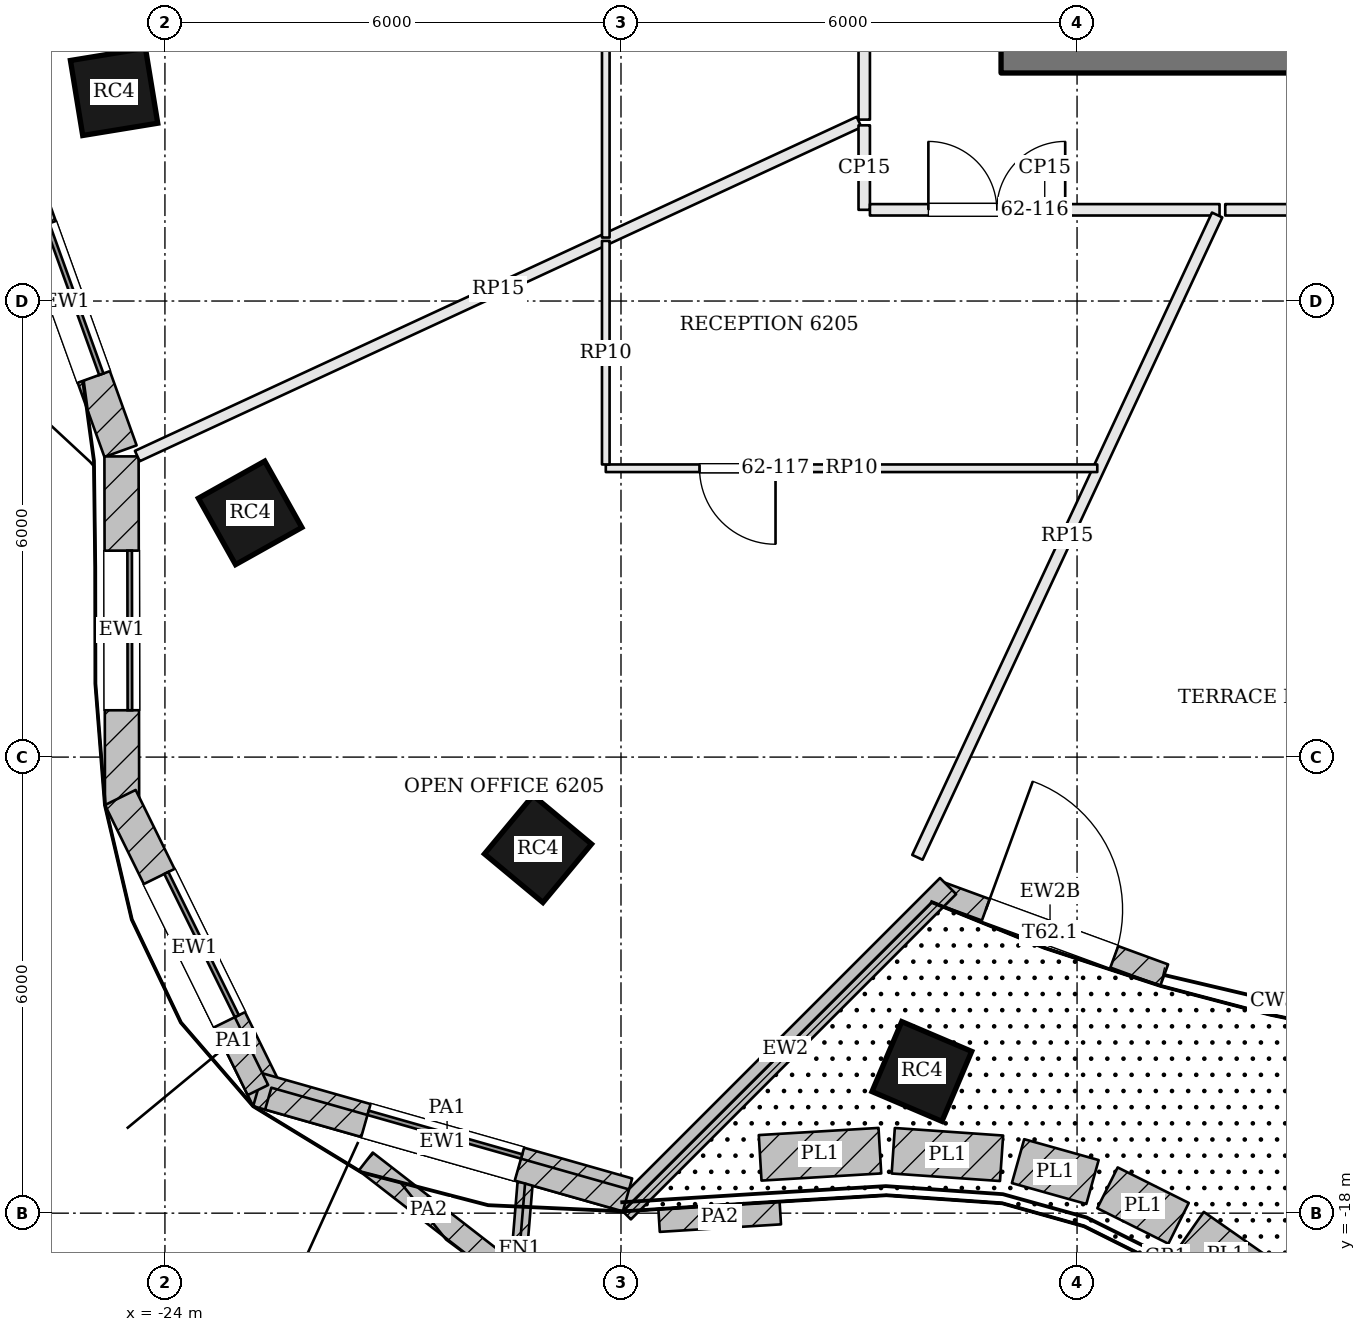
"""IFC4 building model, lengths in metres.
Left out: names, types, materials, properties, quantities, classifications, styles, units other than length and angle.
Written with IfcOpenShell. Run it as: python <this file> out.ifc"""

import sys

from ifc_helpers import new_model, si_unit, direction, frame, frame_2d, origin, origin_2d, place, context, subcontext, project, spatial, rectangle, extrude, element, fill, save


model = new_model("IFC4")
c1 = context("Model", 3, precision=1e-05, world=origin(), true_north=direction((0.0, 1.0)))
c2 = subcontext(c1, "Body", "Model", "MODEL_VIEW")
j1 = project(units=[si_unit("LENGTHUNIT", "METRE"), si_unit("PLANEANGLEUNIT", "RADIAN")], contexts=[c1])
p1 = place(None, origin())
s1 = spatial("IfcSite", under=j1, at=p1, CompositionType="ELEMENT")
p2 = place(p1, origin())
s2 = spatial("IfcBuilding", under=s1, at=p2, CompositionType="ELEMENT")
p3 = place(p2, frame((0.0, 0.0, 252.6)))
s3 = spatial("IfcBuildingStorey", under=s2, at=p3, CompositionType="ELEMENT", Elevation=252.6)
p4 = place(p3, frame((-13.0, -2.6, 0.0), z_axis=(0.0, 0.0, 1.0), x_axis=(1.0, 0.0, 0.0)))
e1 = element("IfcWall", 1, at=p4, inside=s3, PredefinedType="SHEAR", context=c2, shape_type="SweptSolid", body=[
    extrude(rectangle(XDim=26.0, YDim=0.8, at=frame_2d((13.0, 0.0))), origin(), (0.0, 0.0, 1.0), 3.9),
])
p5 = place(p4, frame((9.65, 0.0, 0.0)))
e2 = element("IfcOpeningElement", 2, at=p5, cuts=e1, PredefinedType="OPENING", context=c2, shape_type="SweptSolid", body=[
    extrude(rectangle(XDim=0.9, YDim=2.1, at=frame_2d((0.45, 1.05))), frame((0.0, 0.41, 0.0), z_axis=(0.0, -1.0, 0.0), x_axis=(1.0, 0.0, 0.0)), (0.0, 0.0, 1.0), 0.82),
])
p6 = place(p4, frame((12.925, 0.0, 0.0)))
e3 = element("IfcOpeningElement", 3, at=p6, cuts=e1, PredefinedType="OPENING", context=c2, shape_type="SweptSolid", body=[
    extrude(rectangle(XDim=0.9, YDim=2.1, at=frame_2d((0.45, 1.05))), frame((0.0, 0.41, 0.0), z_axis=(0.0, -1.0, 0.0), x_axis=(1.0, 0.0, 0.0)), (0.0, 0.0, 1.0), 0.82),
])
p7 = place(p4, frame((15.05, 0.0, 0.0)))
e4 = element("IfcOpeningElement", 4, at=p7, cuts=e1, PredefinedType="OPENING", context=c2, shape_type="SweptSolid", body=[
    extrude(rectangle(XDim=1.0, YDim=2.1, at=frame_2d((0.5, 1.05))), frame((0.0, 0.41, 0.0), z_axis=(0.0, -1.0, 0.0), x_axis=(1.0, 0.0, 0.0)), (0.0, 0.0, 1.0), 0.82),
])
p8 = place(p4, frame((16.825, 0.0, 0.0)))
e5 = element("IfcOpeningElement", 5, at=p8, cuts=e1, PredefinedType="OPENING", context=c2, shape_type="SweptSolid", body=[
    extrude(rectangle(XDim=0.7, YDim=2.1, at=frame_2d((0.35, 1.05))), frame((0.0, 0.41, 0.0), z_axis=(0.0, -1.0, 0.0), x_axis=(1.0, 0.0, 0.0)), (0.0, 0.0, 1.0), 0.82),
])
for number, where, z_axis, x_axis in (
    (6, (-24.669, -3.248, 0.0), (0.0, 0.0, 1.0), (0.162, -0.987, 0.0)),
    (7, (-22.879, -8.787, 0.0), (0.0, 0.0, 1.0), (0.489, -0.873, 0.0)),
    (8, (-19.092, -13.209, 0.0), (0.0, 0.0, 1.0), (0.769, -0.639, 0.0)),
    (9, (-14.042, -16.136, 0.0), (0.0, 0.0, 1.0), (0.92, -0.392, 0.0)),
):
    element("IfcColumn", number, at=place(p3, frame(where, z_axis=z_axis, x_axis=x_axis)), inside=s3, PredefinedType="COLUMN", context=c2, shape_type="SweptSolid", body=[
        extrude(rectangle(XDim=1.0, YDim=1.0, at=origin_2d()), origin(), (0.0, 0.0, 1.0), 3.9),
    ])
p9 = place(p3, frame((-26.0, -4.047, 0.0), z_axis=(0.0, 0.0, 1.0), x_axis=(0.338924456066, -0.940813591037, 0.0)))
e10 = element("IfcWall", 10, at=p9, inside=s3, PredefinedType="SOLIDWALL", context=c2, shape_type="SweptSolid", body=[
    extrude(rectangle(XDim=4.175, YDim=0.45, at=frame_2d((2.087, 0.0))), origin(), (0.0, 0.0, 1.0), 3.7),
])
p10 = place(p9, frame((1.038, 0.0, 0.9)))
e11 = element("IfcOpeningElement", 11, at=p10, cuts=e10, PredefinedType="OPENING", context=c2, shape_type="SweptSolid", body=[
    extrude(rectangle(XDim=2.1, YDim=2.3, at=frame_2d((1.05, 1.15))), frame((0.0, 0.235, 0.0), z_axis=(0.0, -1.0, 0.0), x_axis=(1.0, 0.0, 0.0)), (0.0, 0.0, 1.0), 0.47),
])
p11 = place(p3, frame((-24.571, -8.044, 0.0), z_axis=(0.0, 0.0, 1.0), x_axis=(0.001546005189, -0.999998804933, 0.0)))
e12 = element("IfcWall", 12, at=p11, inside=s3, PredefinedType="SOLIDWALL", context=c2, shape_type="SweptSolid", body=[
    extrude(rectangle(XDim=4.58, YDim=0.45, at=frame_2d((2.29, 0.0))), origin(), (0.0, 0.0, 1.0), 3.7),
])
p12 = place(p11, frame((1.24, 0.0, 0.9)))
e13 = element("IfcOpeningElement", 13, at=p12, cuts=e12, PredefinedType="OPENING", context=c2, shape_type="SweptSolid", body=[
    extrude(rectangle(XDim=2.1, YDim=2.3, at=frame_2d((1.05, 1.15))), frame((0.0, 0.235, 0.0), z_axis=(0.0, -1.0, 0.0), x_axis=(1.0, 0.0, 0.0)), (0.0, 0.0, 1.0), 0.47),
])
p13 = place(p3, frame((-24.587, -12.531, 0.0), z_axis=(0.0, 0.0, 1.0), x_axis=(0.441565582365, -0.897228976611, 0.0)))
e14 = element("IfcWall", 14, at=p13, inside=s3, PredefinedType="SOLIDWALL", context=c2, shape_type="SweptSolid", body=[
    extrude(rectangle(XDim=4.416, YDim=0.45, at=frame_2d((2.208, 0.0))), origin(), (0.0, 0.0, 1.0), 3.7),
])
p14 = place(p13, frame((1.158, 0.0, 0.9)))
e15 = element("IfcOpeningElement", 15, at=p14, cuts=e14, PredefinedType="OPENING", context=c2, shape_type="SweptSolid", body=[
    extrude(rectangle(XDim=2.1, YDim=2.3, at=frame_2d((1.05, 1.15))), frame((0.0, 0.235, 0.0), z_axis=(0.0, -1.0, 0.0), x_axis=(1.0, 0.0, 0.0)), (0.0, 0.0, 1.0), 0.47),
])
p15 = place(p3, frame((-22.778, -16.377, 0.0), z_axis=(0.0, 0.0, 1.0), x_axis=(0.961869407366, -0.273509128135, 0.0)))
e16 = element("IfcWall", 16, at=p15, inside=s3, PredefinedType="SOLIDWALL", context=c2, shape_type="SweptSolid", body=[
    extrude(rectangle(XDim=5.056, YDim=0.45, at=frame_2d((2.528, 0.0))), origin(), (0.0, 0.0, 1.0), 3.7),
])
p16 = place(p15, frame((1.478, 0.0, 0.9)))
e17 = element("IfcOpeningElement", 17, at=p16, cuts=e16, PredefinedType="OPENING", context=c2, shape_type="SweptSolid", body=[
    extrude(rectangle(XDim=2.1, YDim=2.3, at=frame_2d((1.05, 1.15))), frame((0.0, 0.235, 0.0), z_axis=(0.0, -1.0, 0.0), x_axis=(1.0, 0.0, 0.0)), (0.0, 0.0, 1.0), 0.47),
])
p17 = place(p3, frame((-13.857, -13.768, 0.0), z_axis=(0.0, 0.0, 1.0), x_axis=(0.939035731174, -0.343819568347, 0.0)))
e18 = element("IfcWall", 18, at=p17, inside=s3, PredefinedType="SOLIDWALL", context=c2, shape_type="SweptSolid", body=[
    extrude(rectangle(XDim=3.199, YDim=0.3, at=frame_2d((1.6, 0.0))), origin(), (0.0, 0.0, 1.0), 3.104),
])
p18 = place(p17, frame((0.699, 0.0, 0.0)))
e19 = element("IfcOpeningElement", 19, at=p18, cuts=e18, PredefinedType="OPENING", context=c2, shape_type="SweptSolid", body=[
    extrude(rectangle(XDim=1.8, YDim=2.4, at=frame_2d((0.9, 1.2))), frame((0.0, 0.16, 0.0), z_axis=(0.0, -1.0, 0.0), x_axis=(1.0, 0.0, 0.0)), (0.0, 0.0, 1.0), 0.32),
])
p19 = place(p3, frame((-19.261, -17.596, 0.0), z_axis=(0.0, 0.0, 1.0), x_axis=(-0.082860766165, -0.996561133815, 0.0)))
e20 = element("IfcWall", 20, at=p19, inside=s3, PredefinedType="SOLIDWALL", context=c2, shape_type="SweptSolid", body=[
    extrude(rectangle(XDim=1.75, YDim=0.2, at=frame_2d((0.875, 0.0))), origin(), (0.0, 0.0, 1.0), 3.7),
])
p20 = place(p3, frame((-17.976, -17.976, 0.0), z_axis=(0.0, 0.0, 1.0), x_axis=(0.707106781187, 0.707106781187, 0.0)))
e21 = element("IfcWall", 21, at=p20, inside=s3, PredefinedType="SOLIDWALL", context=c2, shape_type="SweptSolid", body=[
    extrude(rectangle(XDim=6.052, YDim=0.3, at=frame_2d((3.026, 0.0))), origin(), (0.0, 0.0, 1.0), 3.254),
])
p21 = place(p3, frame((-16.169, -17.272, 0.0), z_axis=(0.0, 0.0, 1.0), x_axis=(0.998215190025, 0.059719631641, 0.0)))
e22 = element("IfcWall", 22, at=p21, inside=s3, PredefinedType="SOLIDWALL", context=c2, shape_type="SweptSolid", body=[
    extrude(rectangle(XDim=1.578, YDim=0.6, at=frame_2d((0.789, 0.0))), origin(), (0.0, 0.0, 1.0), 0.6),
])
p22 = place(p3, frame((-14.418, -17.179, 0.0), z_axis=(0.0, 0.0, 1.0), x_axis=(0.997590527083, -0.069376799246, 0.0)))
e23 = element("IfcWall", 23, at=p22, inside=s3, PredefinedType="SOLIDWALL", context=c2, shape_type="SweptSolid", body=[
    extrude(rectangle(XDim=1.429, YDim=0.6, at=frame_2d((0.714, 0.0))), origin(), (0.0, 0.0, 1.0), 0.6),
])
p23 = place(p3, frame((-12.776, -17.315, 0.0), z_axis=(0.0, 0.0, 1.0), x_axis=(0.962816860543, -0.270154942679, 0.0)))
e24 = element("IfcWall", 24, at=p23, inside=s3, PredefinedType="SOLIDWALL", context=c2, shape_type="SweptSolid", body=[
    extrude(rectangle(XDim=1.018, YDim=0.6, at=frame_2d((0.509, 0.0))), origin(), (0.0, 0.0, 1.0), 0.6),
])
p24 = place(p3, frame((-11.6, -17.667, 0.0), z_axis=(0.0, 0.0, 1.0), x_axis=(0.894613879991, -0.446840022522, 0.0)))
e25 = element("IfcWall", 25, at=p24, inside=s3, PredefinedType="SOLIDWALL", context=c2, shape_type="SweptSolid", body=[
    extrude(rectangle(XDim=1.046, YDim=0.6, at=frame_2d((0.523, 0.0))), origin(), (0.0, 0.0, 1.0), 0.6),
])
p25 = place(p3, frame((-10.504, -18.229, 0.0), z_axis=(0.0, 0.0, 1.0), x_axis=(0.819812123678, -0.572632588901, 0.0)))
e26 = element("IfcWall", 26, at=p25, inside=s3, PredefinedType="SOLIDWALL", context=c2, shape_type="SweptSolid", body=[
    extrude(rectangle(XDim=1.126, YDim=0.6, at=frame_2d((0.563, 0.0))), origin(), (0.0, 0.0, 1.0), 0.6),
])
p26 = place(p3, frame((-17.499, -18.096, 0.0), z_axis=(0.0, 0.0, 1.0), x_axis=(0.998083372436, 0.061883613876, 0.0)))
e27 = element("IfcWall", 27, at=p26, inside=s3, PredefinedType="PARAPET", context=c2, shape_type="SweptSolid", body=[
    extrude(rectangle(XDim=1.598, YDim=0.3, at=frame_2d((0.799, 0.0))), origin(), (0.0, 0.0, 1.0), 1.1),
])
p27 = place(p3, frame((-19.706, -18.602, 0.0), z_axis=(0.0, 0.0, 1.0), x_axis=(-0.79025672685, 0.612775901671, 0.0)))
e28 = element("IfcWall", 28, at=p27, inside=s3, PredefinedType="PARAPET", context=c2, shape_type="SweptSolid", body=[
    extrude(rectangle(XDim=2.091, YDim=0.3, at=frame_2d((1.045, 0.0))), origin(), (0.0, 0.0, 1.0), 1.1),
])
p28 = place(p3, frame((-23.407, -15.1, 3.9), z_axis=(0.0, 0.0, 1.0), x_axis=(0.441525139575, -0.897248879143, 0.0)))
e29 = element("IfcWall", 29, at=p28, inside=s3, PredefinedType="PARAPET", context=c2, shape_type="SweptSolid", body=[
    extrude(rectangle(XDim=1.427, YDim=0.3, at=frame_2d((0.714, 0.0))), origin(), (0.0, 0.0, 1.0), 1.1),
])
p29 = place(p3, frame((-22.641, -16.493, 3.9), z_axis=(0.0, 0.0, 1.0), x_axis=(0.96185467035, -0.273560949565, 0.0)))
e30 = element("IfcWall", 30, at=p29, inside=s3, PredefinedType="PARAPET", context=c2, shape_type="SweptSolid", body=[
    extrude(rectangle(XDim=4.892, YDim=0.3, at=frame_2d((2.446, 0.0))), origin(), (0.0, 0.0, 1.0), 1.1),
])
p30 = place(p3, frame((-14.8, 3.612, 0.0), z_axis=(0.0, 0.0, 1.0), x_axis=(0.0, -1.0, 0.0)))
e31 = element("IfcWall", 31, at=p30, inside=s3, PredefinedType="PARTITIONING", context=c2, shape_type="SweptSolid", body=[
    extrude(rectangle(XDim=7.225, YDim=0.15, at=frame_2d((3.613, 0.0))), origin(), (0.0, 0.0, 1.0), 3.084),
])
p31 = place(p30, frame((1.217, 0.0, 0.0)))
e32 = element("IfcOpeningElement", 32, at=p31, cuts=e31, PredefinedType="OPENING", context=c2, shape_type="SweptSolid", body=[
    extrude(rectangle(XDim=1.0, YDim=2.1, at=frame_2d((0.5, 1.05))), frame((0.0, 0.085, 0.0), z_axis=(0.0, -1.0, 0.0), x_axis=(1.0, 0.0, 0.0)), (0.0, 0.0, 1.0), 0.17),
])
p32 = place(p30, frame((4.867, 0.0, 0.0)))
e33 = element("IfcOpeningElement", 33, at=p32, cuts=e31, PredefinedType="OPENING", context=c2, shape_type="SweptSolid", body=[
    extrude(rectangle(XDim=1.0, YDim=2.4, at=frame_2d((0.5, 1.2))), frame((0.0, 0.085, 0.0), z_axis=(0.0, -1.0, 0.0), x_axis=(1.0, 0.0, 0.0)), (0.0, 0.0, 1.0), 0.17),
])
p33 = place(p3, frame((-24.363, -8.04, 0.0), z_axis=(0.0, 0.0, 1.0), x_axis=(0.907507429398, 0.420036028916, 0.0)))
e34 = element("IfcWall", 34, at=p33, inside=s3, PredefinedType="PARTITIONING", context=c2, shape_type="SweptSolid", body=[
    extrude(rectangle(XDim=10.463, YDim=0.15, at=frame_2d((5.231, 0.0))), origin(), (0.0, 0.0, 1.0), 3.084),
])
p34 = place(p3, frame((-14.8, -3.688, 0.0), z_axis=(0.0, 0.0, 1.0), x_axis=(0.0, -1.0, 0.0)))
e35 = element("IfcWall", 35, at=p34, inside=s3, PredefinedType="PARTITIONING", context=c2, shape_type="SweptSolid", body=[
    extrude(rectangle(XDim=1.112, YDim=0.15, at=frame_2d((0.556, 0.0))), origin(), (0.0, 0.0, 1.0), 3.084),
])
p35 = place(p3, frame((-14.725, -4.8, 0.0), z_axis=(0.0, 0.0, 1.0), x_axis=(1.0, 0.0, 0.0)))
e36 = element("IfcWall", 36, at=p35, inside=s3, PredefinedType="PARTITIONING", context=c2, shape_type="SweptSolid", body=[
    extrude(rectangle(XDim=4.6, YDim=0.15, at=frame_2d((2.3, 0.0))), origin(), (0.0, 0.0, 1.0), 3.084),
])
p36 = place(p35, frame((0.769, 0.0, 0.0)))
e37 = element("IfcOpeningElement", 37, at=p36, cuts=e36, PredefinedType="OPENING", context=c2, shape_type="SweptSolid", body=[
    extrude(rectangle(XDim=1.8, YDim=2.1, at=frame_2d((0.9, 1.05))), frame((0.0, 0.085, 0.0), z_axis=(0.0, -1.0, 0.0), x_axis=(1.0, 0.0, 0.0)), (0.0, 0.0, 1.0), 0.17),
])
p37 = place(p3, frame((-14.1, -13.319, 0.0), z_axis=(0.0, 0.0, 1.0), x_axis=(0.422849635533, 0.906199859705, 0.0)))
e38 = element("IfcWall", 38, at=p37, inside=s3, PredefinedType="PARTITIONING", context=c2, shape_type="SweptSolid", body=[
    extrude(rectangle(XDim=9.326, YDim=0.15, at=frame_2d((4.663, 0.0))), origin(), (0.0, 0.0, 1.0), 3.084),
])
p38 = place(p3, frame((-10.05, -4.8, 0.0), z_axis=(0.0, 0.0, 1.0), x_axis=(1.0, 0.0, 0.0)))
e39 = element("IfcWall", 39, at=p38, inside=s3, PredefinedType="PARTITIONING", context=c2, shape_type="SweptSolid", body=[
    extrude(rectangle(XDim=5.471, YDim=0.15, at=frame_2d((2.736, 0.0))), origin(), (0.0, 0.0, 1.0), 3.084),
])
p39 = place(p38, frame((1.798, 0.0, 0.0)))
e40 = element("IfcOpeningElement", 40, at=p39, cuts=e39, PredefinedType="OPENING", context=c2, shape_type="SweptSolid", body=[
    extrude(rectangle(XDim=1.8, YDim=2.1, at=frame_2d((0.9, 1.05))), frame((0.0, 0.085, 0.0), z_axis=(0.0, -1.0, 0.0), x_axis=(1.0, 0.0, 0.0)), (0.0, 0.0, 1.0), 0.17),
])
p40 = place(p3, frame((-18.2, -5.165, 0.0), z_axis=(0.0, 0.0, 1.0), x_axis=(0.0, 1.0, 0.0)))
e41 = element("IfcWall", 41, at=p40, inside=s3, PredefinedType="PARTITIONING", context=c2, shape_type="SweptSolid", body=[
    extrude(rectangle(XDim=10.201, YDim=0.1, at=frame_2d((5.1, 0.0))), origin(), (0.0, 0.0, 1.0), 3.084),
])
p41 = place(p40, frame((7.22, 0.0, 0.0)))
e42 = element("IfcOpeningElement", 42, at=p41, cuts=e41, PredefinedType="OPENING", context=c2, shape_type="SweptSolid", body=[
    extrude(rectangle(XDim=1.0, YDim=2.1, at=frame_2d((0.5, 1.05))), frame((0.0, 0.06, 0.0), z_axis=(0.0, -1.0, 0.0), x_axis=(1.0, 0.0, 0.0)), (0.0, 0.0, 1.0), 0.12),
])
p42 = place(p3, frame((-11.734, -8.2, 0.0), z_axis=(0.0, 0.0, 1.0), x_axis=(-1.0, 0.0, 0.0)))
e43 = element("IfcWall", 43, at=p42, inside=s3, PredefinedType="PARTITIONING", context=c2, shape_type="SweptSolid", body=[
    extrude(rectangle(XDim=6.466, YDim=0.1, at=frame_2d((3.233, 0.0))), origin(), (0.0, 0.0, 1.0), 3.084),
])
p43 = place(p42, frame((4.233, 0.0, 0.0)))
e44 = element("IfcOpeningElement", 44, at=p43, cuts=e43, PredefinedType="OPENING", context=c2, shape_type="SweptSolid", body=[
    extrude(rectangle(XDim=1.0, YDim=2.1, at=frame_2d((0.5, 1.05))), frame((0.0, 0.06, 0.0), z_axis=(0.0, -1.0, 0.0), x_axis=(1.0, 0.0, 0.0)), (0.0, 0.0, 1.0), 0.12),
])
p44 = place(p3, frame((-18.2, -8.15, 0.0), z_axis=(0.0, 0.0, 1.0), x_axis=(0.0, 1.0, 0.0)))
e45 = element("IfcWall", 45, at=p44, inside=s3, PredefinedType="PARTITIONING", context=c2, shape_type="SweptSolid", body=[
    extrude(rectangle(XDim=2.941, YDim=0.1, at=frame_2d((1.47, 0.0))), origin(), (0.0, 0.0, 1.0), 3.084),
])
p45 = place(p10, origin())
e46 = element("IfcWindow", 46, at=p45, inside=s3, PartitioningType="SINGLE_PANEL", PredefinedType="WINDOW", context=c2, shape_type="SweptSolid", body=[
    extrude(rectangle(XDim=2.1, YDim=2.3, at=frame_2d((1.05, 1.15))), frame((0.0, 0.135, 0.0), z_axis=(0.0, -1.0, 0.0), x_axis=(1.0, 0.0, 0.0)), (0.0, 0.0, 1.0), 0.06),
])
fill(e11, e46)
p46 = place(p12, origin())
e47 = element("IfcWindow", 47, at=p46, inside=s3, PartitioningType="SINGLE_PANEL", PredefinedType="WINDOW", context=c2, shape_type="SweptSolid", body=[
    extrude(rectangle(XDim=2.1, YDim=2.3, at=frame_2d((1.05, 1.15))), frame((0.0, 0.135, 0.0), z_axis=(0.0, -1.0, 0.0), x_axis=(1.0, 0.0, 0.0)), (0.0, 0.0, 1.0), 0.06),
])
fill(e13, e47)
p47 = place(p14, origin())
e48 = element("IfcWindow", 48, at=p47, inside=s3, PartitioningType="SINGLE_PANEL", PredefinedType="WINDOW", context=c2, shape_type="SweptSolid", body=[
    extrude(rectangle(XDim=2.1, YDim=2.3, at=frame_2d((1.05, 1.15))), frame((0.0, 0.135, 0.0), z_axis=(0.0, -1.0, 0.0), x_axis=(1.0, 0.0, 0.0)), (0.0, 0.0, 1.0), 0.06),
])
fill(e15, e48)
p48 = place(p16, origin())
e49 = element("IfcWindow", 49, at=p48, inside=s3, PartitioningType="SINGLE_PANEL", PredefinedType="WINDOW", context=c2, shape_type="SweptSolid", body=[
    extrude(rectangle(XDim=2.1, YDim=2.3, at=frame_2d((1.05, 1.15))), frame((0.0, 0.135, 0.0), z_axis=(0.0, -1.0, 0.0), x_axis=(1.0, 0.0, 0.0)), (0.0, 0.0, 1.0), 0.06),
])
fill(e17, e49)
p49 = place(p18, origin())
e50 = element("IfcDoor", 50, at=p49, inside=s3, OperationType="DOUBLE_DOOR_DOUBLE_SWING", PredefinedType="DOOR", context=c2, shape_type="SweptSolid", body=[
    extrude(rectangle(XDim=1.8, YDim=2.4, at=frame_2d((0.9, 1.2))), frame((0.0, 0.025, 0.0), z_axis=(0.0, -1.0, 0.0), x_axis=(1.0, 0.0, 0.0)), (0.0, 0.0, 1.0), 0.05),
])
fill(e19, e50)
p50 = place(p36, origin())
e51 = element("IfcDoor", 51, at=p50, inside=s3, OperationType="DOUBLE_DOOR_SINGLE_SWING", PredefinedType="DOOR", context=c2, shape_type="SweptSolid", body=[
    extrude(rectangle(XDim=1.8, YDim=2.1, at=frame_2d((0.9, 1.05))), frame((0.0, 0.025, 0.0), z_axis=(0.0, -1.0, 0.0), x_axis=(1.0, 0.0, 0.0)), (0.0, 0.0, 1.0), 0.05),
])
fill(e37, e51)
p51 = place(p43, origin())
e52 = element("IfcDoor", 52, at=p51, inside=s3, OperationType="SINGLE_SWING_LEFT", PredefinedType="DOOR", context=c2, shape_type="SweptSolid", body=[
    extrude(rectangle(XDim=1.0, YDim=2.1, at=frame_2d((0.5, 1.05))), frame((0.0, 0.025, 0.0), z_axis=(0.0, -1.0, 0.0), x_axis=(1.0, 0.0, 0.0)), (0.0, 0.0, 1.0), 0.05),
])
fill(e44, e52)
save(model, sys.argv[1])
